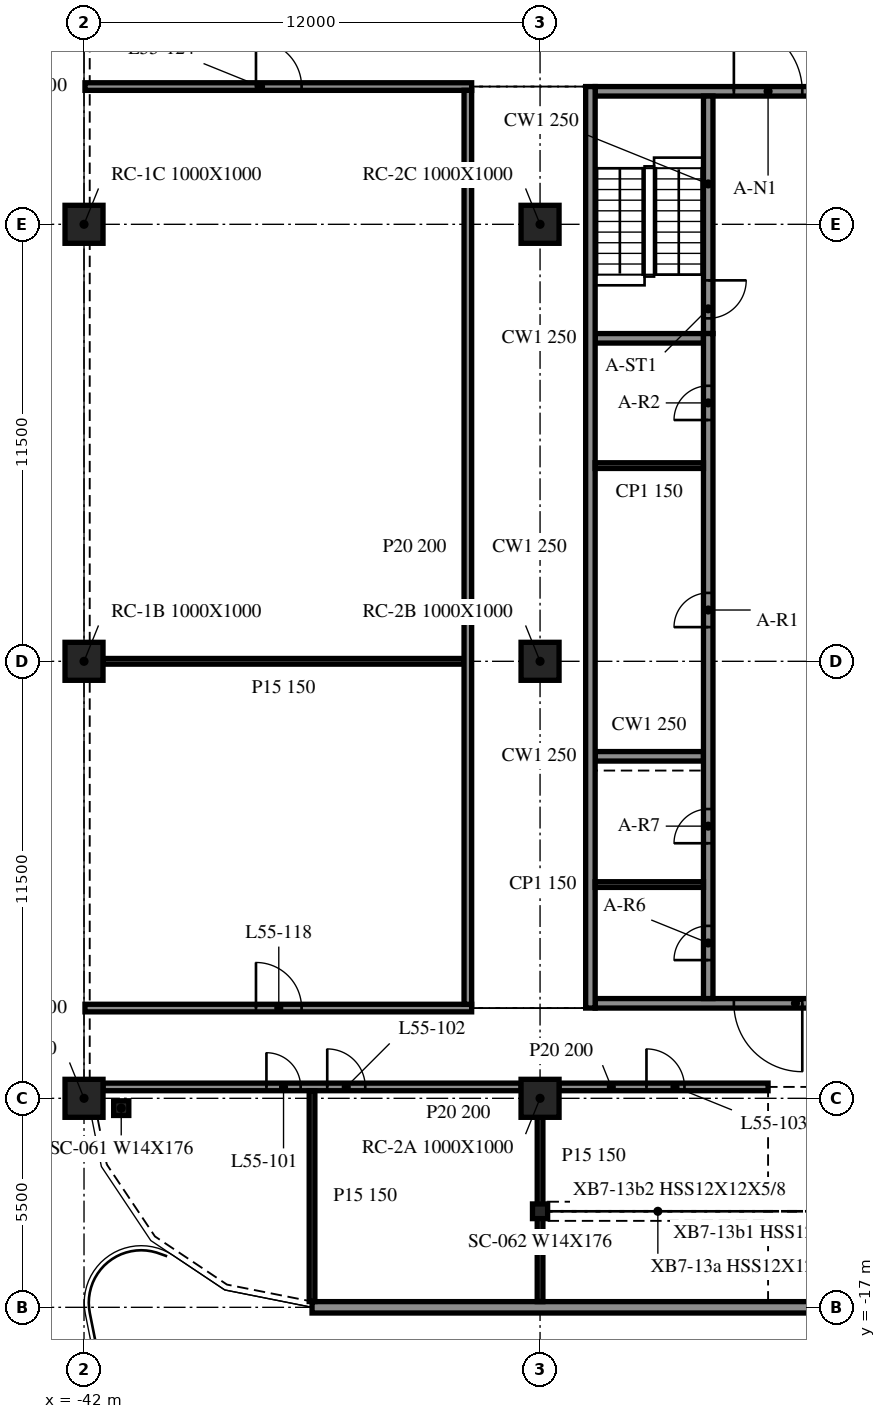
"""IFC4 building model, lengths in metres.
Left out: names, types, materials, properties, quantities, classifications, styles, units other than length and angle.
Written with IfcOpenShell. Run it as: python <this file> out.ifc"""

import sys

from ifc_helpers import new_model, si_unit, direction, frame, frame_2d, origin, origin_2d, place, context, subcontext, project, spatial, rectangle, i_section, extrude, element, fill, save


model = new_model("IFC4")
c1 = context("Model", 3, precision=1e-05, world=origin(), true_north=direction((0.0, 1.0)))
c2 = subcontext(c1, "Body", "Model", "MODEL_VIEW")
j1 = project(units=[si_unit("LENGTHUNIT", "METRE"), si_unit("PLANEANGLEUNIT", "RADIAN")], contexts=[c1])
p1 = place(None, origin())
s1 = spatial("IfcSite", under=j1, at=p1, CompositionType="ELEMENT")
p2 = place(p1, origin())
s2 = spatial("IfcBuilding", under=s1, at=p2, CompositionType="ELEMENT")
p3 = place(p2, frame((0.0, 0.0, 228.6)))
s3 = spatial("IfcBuildingStorey", under=s2, at=p3, CompositionType="ELEMENT", Elevation=228.6)
for number, where, z_axis, x_axis in (
    (1, (-42.0, -11.5, -0.34), (0.0, 0.0, 1.0), (1.0, 0.0, 0.0)),
    (2, (-42.0, 0.0, -0.34), (0.0, 0.0, 1.0), (1.0, 0.0, 0.0)),
    (3, (-42.0, 11.5, -0.34), (0.0, 0.0, 1.0), (1.0, 0.0, 0.0)),
    (4, (-30.0, -11.5, -0.34), (0.0, 0.0, 1.0), (1.0, 0.0, 0.0)),
    (5, (-30.0, 0.0, -0.34), (0.0, 0.0, 1.0), (1.0, 0.0, 0.0)),
    (6, (-30.0, 11.5, -0.34), (0.0, 0.0, 1.0), (1.0, 0.0, 0.0)),
):
    element("IfcColumn", number, at=place(p3, frame(where, z_axis=z_axis, x_axis=x_axis)), inside=s3, PredefinedType="COLUMN", context=c2, shape_type="SweptSolid", body=[
        extrude(rectangle(XDim=1.0, YDim=1.0, at=origin_2d()), origin(), (0.0, 0.0, 1.0), 3.8),
    ])
for number, where, z_axis, x_axis in (
    (7, (-41.021, -11.758, -0.34), (0.0, 0.0, 1.0), (1.0, 0.0, 0.0)),
    (8, (-30.0, -14.473, -0.34), (0.0, 0.0, 1.0), (1.0, 0.0, 0.0)),
):
    element("IfcColumn", number, at=place(p3, frame(where, z_axis=z_axis, x_axis=x_axis)), inside=s3, PredefinedType="COLUMN", context=c2, shape_type="SweptSolid", body=[
        extrude(i_section(OverallWidth=0.399, OverallDepth=0.386, WebThickness=0.021, FlangeThickness=0.033, at=origin_2d()), origin(), (0.0, 0.0, 1.0), 3.8),
    ])
p4 = place(p3, frame((-36.0, -17.0, 0.0), z_axis=(0.0, 0.0, 1.0), x_axis=(1.0, 0.0, 0.0)))
e9 = element("IfcWall", 9, at=p4, inside=s3, PredefinedType="NOTDEFINED", context=c2, shape_type="SweptSolid", body=[
    extrude(rectangle(XDim=84.0, YDim=0.3, at=frame_2d((42.0, 0.0))), origin(), (0.0, 0.0, 1.0), 2.853),
])
p5 = place(p4, frame((40.5, 0.0, 0.0)))
e10 = element("IfcOpeningElement", 10, at=p5, cuts=e9, PredefinedType="OPENING", context=c2, shape_type="SweptSolid", body=[
    extrude(rectangle(XDim=3.0, YDim=2.4, at=frame_2d((1.5, 1.2))), frame((0.0, 0.16, 0.0), z_axis=(0.0, -1.0, 0.0), x_axis=(1.0, 0.0, 0.0)), (0.0, 0.0, 1.0), 0.32),
])
p6 = place(p3, frame((-28.675, 15.125, 0.0), z_axis=(0.0, 0.0, 1.0), x_axis=(0.0, -1.0, 0.0)))
e11 = element("IfcWall", 11, at=p6, inside=s3, PredefinedType="SOLIDWALL", context=c2, shape_type="SweptSolid", body=[
    extrude(rectangle(XDim=24.25, YDim=0.25, at=frame_2d((12.125, 0.0))), origin(), (0.0, 0.0, 1.0), 3.46),
])
p7 = place(p3, frame((-19.45, -9.0, 0.0), z_axis=(0.0, 0.0, 1.0), x_axis=(-1.0, 0.0, 0.0)))
e12 = element("IfcWall", 12, at=p7, inside=s3, PredefinedType="SOLIDWALL", context=c2, shape_type="SweptSolid", body=[
    extrude(rectangle(XDim=9.1, YDim=0.25, at=frame_2d((4.55, 0.0))), origin(), (0.0, 0.0, 1.0), 3.46),
])
p8 = place(p7, frame((3.65, 0.0, 0.0)))
e13 = element("IfcOpeningElement", 13, at=p8, cuts=e12, PredefinedType="OPENING", context=c2, shape_type="SweptSolid", body=[
    extrude(rectangle(XDim=1.8, YDim=2.1, at=frame_2d((0.9, 1.05))), frame((0.0, 0.135, 0.0), z_axis=(0.0, -1.0, 0.0), x_axis=(1.0, 0.0, 0.0)), (0.0, 0.0, 1.0), 0.27),
])
p9 = place(p3, frame((-28.55, 15.0, 0.0), z_axis=(0.0, 0.0, 1.0), x_axis=(1.0, 0.0, 0.0)))
e14 = element("IfcWall", 14, at=p9, inside=s3, PredefinedType="SOLIDWALL", context=c2, shape_type="SweptSolid", body=[
    extrude(rectangle(XDim=9.1, YDim=0.25, at=frame_2d((4.55, 0.0))), origin(), (0.0, 0.0, 1.0), 3.46),
])
p10 = place(p9, frame((3.65, 0.0, 0.0)))
e15 = element("IfcOpeningElement", 15, at=p10, cuts=e14, PredefinedType="OPENING", context=c2, shape_type="SweptSolid", body=[
    extrude(rectangle(XDim=1.8, YDim=2.1, at=frame_2d((0.9, 1.05))), frame((0.0, 0.135, 0.0), z_axis=(0.0, -1.0, 0.0), x_axis=(1.0, 0.0, 0.0)), (0.0, 0.0, 1.0), 0.27),
])
p11 = place(p3, frame((-25.575, -8.875, 0.0), z_axis=(0.0, 0.0, 1.0), x_axis=(0.0, 1.0, 0.0)))
e16 = element("IfcWall", 16, at=p11, inside=s3, PredefinedType="SOLIDWALL", context=c2, shape_type="SweptSolid", body=[
    extrude(rectangle(XDim=17.5, YDim=0.25, at=frame_2d((8.75, 0.0))), origin(), (0.0, 0.0, 1.0), 3.46),
])
p12 = place(p11, frame((9.775, 0.0, 0.0)))
e17 = element("IfcOpeningElement", 17, at=p12, cuts=e16, PredefinedType="OPENING", context=c2, shape_type="SweptSolid", body=[
    extrude(rectangle(XDim=0.9, YDim=2.1, at=frame_2d((0.45, 1.05))), frame((0.0, 0.135, 0.0), z_axis=(0.0, -1.0, 0.0), x_axis=(1.0, 0.0, 0.0)), (0.0, 0.0, 1.0), 0.27),
])
p13 = place(p11, frame((15.225, 0.0, 0.0)))
e18 = element("IfcOpeningElement", 18, at=p13, cuts=e16, PredefinedType="OPENING", context=c2, shape_type="SweptSolid", body=[
    extrude(rectangle(XDim=0.9, YDim=2.1, at=frame_2d((0.45, 1.05))), frame((0.0, 0.135, 0.0), z_axis=(0.0, -1.0, 0.0), x_axis=(1.0, 0.0, 0.0)), (0.0, 0.0, 1.0), 0.27),
])
p14 = place(p11, frame((1.012, 0.0, 0.0)))
e19 = element("IfcOpeningElement", 19, at=p14, cuts=e16, PredefinedType="OPENING", context=c2, shape_type="SweptSolid", body=[
    extrude(rectangle(XDim=0.9, YDim=2.1, at=frame_2d((0.45, 1.05))), frame((0.0, 0.135, 0.0), z_axis=(0.0, -1.0, 0.0), x_axis=(1.0, 0.0, 0.0)), (0.0, 0.0, 1.0), 0.27),
])
p15 = place(p11, frame((4.087, 0.0, 0.0)))
e20 = element("IfcOpeningElement", 20, at=p15, cuts=e16, PredefinedType="OPENING", context=c2, shape_type="SweptSolid", body=[
    extrude(rectangle(XDim=0.9, YDim=2.1, at=frame_2d((0.45, 1.05))), frame((0.0, 0.135, 0.0), z_axis=(0.0, -1.0, 0.0), x_axis=(1.0, 0.0, 0.0)), (0.0, 0.0, 1.0), 0.27),
])
p16 = place(p3, frame((-25.575, 14.875, 0.0), z_axis=(0.0, 0.0, 1.0), x_axis=(0.0, -1.0, 0.0)))
e21 = element("IfcWall", 21, at=p16, inside=s3, PredefinedType="SOLIDWALL", context=c2, shape_type="SweptSolid", body=[
    extrude(rectangle(XDim=6.25, YDim=0.25, at=frame_2d((3.125, 0.0))), origin(), (0.0, 0.0, 1.0), 3.46),
])
p17 = place(p16, frame((4.85, 0.0, 0.0)))
e22 = element("IfcOpeningElement", 22, at=p17, cuts=e21, PredefinedType="OPENING", context=c2, shape_type="SweptSolid", body=[
    extrude(rectangle(XDim=1.0, YDim=2.1, at=frame_2d((0.5, 1.05))), frame((0.0, 0.135, 0.0), z_axis=(0.0, -1.0, 0.0), x_axis=(1.0, 0.0, 0.0)), (0.0, 0.0, 1.0), 0.27),
])
for number, where, z_axis, x_axis in (
    (23, (-28.55, -2.5, 0.0), (0.0, 0.0, 1.0), (1.0, 0.0, 0.0)),
    (24, (-28.55, 8.5, 0.0), (0.0, 0.0, 1.0), (1.0, 0.0, 0.0)),
):
    element("IfcWall", number, at=place(p3, frame(where, z_axis=z_axis, x_axis=x_axis)), inside=s3, PredefinedType="SOLIDWALL", context=c2, shape_type="SweptSolid", body=[
        extrude(rectangle(XDim=2.85, YDim=0.25, at=frame_2d((1.425, 0.0))), origin(), (0.0, 0.0, 1.0), 3.46),
    ])
for number, where, z_axis, x_axis in (
    (25, (-28.55, 5.15, 0.0), (0.0, 0.0, 1.0), (1.0, 0.0, 0.0)),
    (26, (-28.55, -5.875, 0.0), (0.0, 0.0, 1.0), (1.0, 0.0, 0.0)),
):
    element("IfcWall", number, at=place(p3, frame(where, z_axis=z_axis, x_axis=x_axis)), inside=s3, PredefinedType="PARTITIONING", context=c2, shape_type="SweptSolid", body=[
        extrude(rectangle(XDim=2.85, YDim=0.15, at=frame_2d((1.425, 0.0))), origin(), (0.0, 0.0, 1.0), 3.46),
    ])
p18 = place(p3, frame((-41.5, -11.2, 0.0), z_axis=(0.0, 0.0, 1.0), x_axis=(1.0, 0.0, 0.0)))
e27 = element("IfcWall", 27, at=p18, inside=s3, PredefinedType="PARTITIONING", context=c2, shape_type="SweptSolid", body=[
    extrude(rectangle(XDim=11.0, YDim=0.2, at=frame_2d((5.5, 0.0))), origin(), (0.0, 0.0, 1.0), 3.46),
])
p19 = place(p18, frame((4.3, 0.0, 0.0)))
e28 = element("IfcOpeningElement", 28, at=p19, cuts=e27, PredefinedType="OPENING", context=c2, shape_type="SweptSolid", body=[
    extrude(rectangle(XDim=0.9, YDim=2.1, at=frame_2d((0.45, 1.05))), frame((0.0, 0.11, 0.0), z_axis=(0.0, -1.0, 0.0), x_axis=(1.0, 0.0, 0.0)), (0.0, 0.0, 1.0), 0.22),
])
p20 = place(p18, frame((5.9, 0.0, 0.0)))
e29 = element("IfcOpeningElement", 29, at=p20, cuts=e27, PredefinedType="OPENING", context=c2, shape_type="SweptSolid", body=[
    extrude(rectangle(XDim=1.0, YDim=2.1, at=frame_2d((0.5, 1.05))), frame((0.0, 0.11, 0.0), z_axis=(0.0, -1.0, 0.0), x_axis=(1.0, 0.0, 0.0)), (0.0, 0.0, 1.0), 0.22),
])
p21 = place(p3, frame((-29.5, -11.2, 0.0), z_axis=(0.0, 0.0, 1.0), x_axis=(1.0, 0.0, 0.0)))
e30 = element("IfcWall", 30, at=p21, inside=s3, PredefinedType="PARTITIONING", context=c2, shape_type="SweptSolid", body=[
    extrude(rectangle(XDim=5.5, YDim=0.2, at=frame_2d((2.75, 0.0))), origin(), (0.0, 0.0, 1.0), 3.46),
])
p22 = place(p21, frame((2.3, 0.0, 0.0)))
e31 = element("IfcOpeningElement", 31, at=p22, cuts=e30, PredefinedType="OPENING", context=c2, shape_type="SweptSolid", body=[
    extrude(rectangle(XDim=1.0, YDim=2.1, at=frame_2d((0.5, 1.05))), frame((0.0, 0.11, 0.0), z_axis=(0.0, -1.0, 0.0), x_axis=(1.0, 0.0, 0.0)), (0.0, 0.0, 1.0), 0.22),
])
p23 = place(p3, frame((-41.975, -9.125, 0.0), z_axis=(0.0, 0.0, 1.0), x_axis=(1.0, 0.0, 0.0)))
e32 = element("IfcWall", 32, at=p23, inside=s3, PredefinedType="PARTITIONING", context=c2, shape_type="SweptSolid", body=[
    extrude(rectangle(XDim=10.175, YDim=0.2, at=frame_2d((5.087, 0.0))), origin(), (0.0, 0.0, 1.0), 3.46),
])
p24 = place(p23, frame((4.5, 0.0, 0.0)))
e33 = element("IfcOpeningElement", 33, at=p24, cuts=e32, PredefinedType="OPENING", context=c2, shape_type="SweptSolid", body=[
    extrude(rectangle(XDim=1.2, YDim=2.1, at=frame_2d((0.6, 1.05))), frame((0.0, 0.11, 0.0), z_axis=(0.0, -1.0, 0.0), x_axis=(1.0, 0.0, 0.0)), (0.0, 0.0, 1.0), 0.22),
])
p25 = place(p3, frame((-41.5, 0.0, 0.0), z_axis=(0.0, 0.0, 1.0), x_axis=(1.0, 0.0, 0.0)))
e34 = element("IfcWall", 34, at=p25, inside=s3, PredefinedType="PARTITIONING", context=c2, shape_type="SweptSolid", body=[
    extrude(rectangle(XDim=9.5, YDim=0.15, at=frame_2d((4.75, 0.0))), origin(), (0.0, 0.0, 1.0), 3.46),
])
p26 = place(p3, frame((-41.975, 15.125, 0.0), z_axis=(0.0, 0.0, 1.0), x_axis=(1.0, 0.0, 0.0)))
e35 = element("IfcWall", 35, at=p26, inside=s3, PredefinedType="PARTITIONING", context=c2, shape_type="SweptSolid", body=[
    extrude(rectangle(XDim=10.175, YDim=0.2, at=frame_2d((5.087, 0.0))), origin(), (0.0, 0.0, 1.0), 3.46),
])
p27 = place(p26, frame((4.5, 0.0, 0.0)))
e36 = element("IfcOpeningElement", 36, at=p27, cuts=e35, PredefinedType="OPENING", context=c2, shape_type="SweptSolid", body=[
    extrude(rectangle(XDim=1.2, YDim=2.1, at=frame_2d((0.6, 1.05))), frame((0.0, 0.11, 0.0), z_axis=(0.0, -1.0, 0.0), x_axis=(1.0, 0.0, 0.0)), (0.0, 0.0, 1.0), 0.22),
])
p28 = place(p3, frame((-36.0, -16.847, 0.0), z_axis=(0.0, 0.0, 1.0), x_axis=(0.0, 1.0, 0.0)))
e37 = element("IfcWall", 37, at=p28, inside=s3, PredefinedType="PARTITIONING", context=c2, shape_type="SweptSolid", body=[
    extrude(rectangle(XDim=5.547, YDim=0.15, at=frame_2d((2.773, 0.0))), origin(), (0.0, 0.0, 1.0), 3.46),
])
p29 = place(p3, frame((-31.9, -9.025, 0.0), z_axis=(0.0, 0.0, 1.0), x_axis=(0.0, 1.0, 0.0)))
e38 = element("IfcWall", 38, at=p29, inside=s3, PredefinedType="PARTITIONING", context=c2, shape_type="SweptSolid", body=[
    extrude(rectangle(XDim=24.05, YDim=0.2, at=frame_2d((12.025, 0.0))), origin(), (0.0, 0.0, 1.0), 3.46),
])
p30 = place(p3, frame((-30.0, -16.85, 0.0), z_axis=(0.0, 0.0, 1.0), x_axis=(0.0, 1.0, 0.0)))
e39 = element("IfcWall", 39, at=p30, inside=s3, PredefinedType="PARTITIONING", context=c2, shape_type="SweptSolid", body=[
    extrude(rectangle(XDim=4.85, YDim=0.15, at=frame_2d((2.425, 0.0))), origin(), (0.0, 0.0, 1.0), 3.46),
])
p31 = place(p8, origin())
e40 = element("IfcDoor", 40, at=p31, inside=s3, OperationType="DOUBLE_DOOR_SINGLE_SWING", PredefinedType="DOOR", context=c2, shape_type="SweptSolid", body=[
    extrude(rectangle(XDim=1.8, YDim=2.1, at=frame_2d((0.9, 1.05))), frame((0.0, 0.025, 0.0), z_axis=(0.0, -1.0, 0.0), x_axis=(1.0, 0.0, 0.0)), (0.0, 0.0, 1.0), 0.05),
])
fill(e13, e40)
p32 = place(p10, origin())
e41 = element("IfcDoor", 41, at=p32, inside=s3, OperationType="DOUBLE_DOOR_SINGLE_SWING", PredefinedType="DOOR", context=c2, shape_type="SweptSolid", body=[
    extrude(rectangle(XDim=1.8, YDim=2.1, at=frame_2d((0.9, 1.05))), frame((0.0, 0.025, 0.0), z_axis=(0.0, -1.0, 0.0), x_axis=(1.0, 0.0, 0.0)), (0.0, 0.0, 1.0), 0.05),
])
fill(e15, e41)
p33 = place(p12, origin())
e42 = element("IfcDoor", 42, at=p33, inside=s3, OperationType="SINGLE_SWING_LEFT", PredefinedType="DOOR", context=c2, shape_type="SweptSolid", body=[
    extrude(rectangle(XDim=0.9, YDim=2.1, at=frame_2d((0.45, 1.05))), frame((0.0, 0.025, 0.0), z_axis=(0.0, -1.0, 0.0), x_axis=(1.0, 0.0, 0.0)), (0.0, 0.0, 1.0), 0.05),
])
fill(e17, e42)
p34 = place(p13, origin())
e43 = element("IfcDoor", 43, at=p34, inside=s3, OperationType="SINGLE_SWING_RIGHT", PredefinedType="DOOR", context=c2, shape_type="SweptSolid", body=[
    extrude(rectangle(XDim=0.9, YDim=2.1, at=frame_2d((0.45, 1.05))), frame((0.0, 0.025, 0.0), z_axis=(0.0, -1.0, 0.0), x_axis=(1.0, 0.0, 0.0)), (0.0, 0.0, 1.0), 0.05),
])
fill(e18, e43)
p35 = place(p14, origin())
e44 = element("IfcDoor", 44, at=p35, inside=s3, OperationType="SINGLE_SWING_RIGHT", PredefinedType="DOOR", context=c2, shape_type="SweptSolid", body=[
    extrude(rectangle(XDim=0.9, YDim=2.1, at=frame_2d((0.45, 1.05))), frame((0.0, 0.025, 0.0), z_axis=(0.0, -1.0, 0.0), x_axis=(1.0, 0.0, 0.0)), (0.0, 0.0, 1.0), 0.05),
])
fill(e19, e44)
p36 = place(p15, origin())
e45 = element("IfcDoor", 45, at=p36, inside=s3, OperationType="SINGLE_SWING_LEFT", PredefinedType="DOOR", context=c2, shape_type="SweptSolid", body=[
    extrude(rectangle(XDim=0.9, YDim=2.1, at=frame_2d((0.45, 1.05))), frame((0.0, 0.025, 0.0), z_axis=(0.0, -1.0, 0.0), x_axis=(1.0, 0.0, 0.0)), (0.0, 0.0, 1.0), 0.05),
])
fill(e20, e45)
p37 = place(p17, origin())
e46 = element("IfcDoor", 46, at=p37, inside=s3, OperationType="SINGLE_SWING_LEFT", PredefinedType="DOOR", context=c2, shape_type="SweptSolid", body=[
    extrude(rectangle(XDim=1.0, YDim=2.1, at=frame_2d((0.5, 1.05))), frame((0.0, 0.025, 0.0), z_axis=(0.0, -1.0, 0.0), x_axis=(1.0, 0.0, 0.0)), (0.0, 0.0, 1.0), 0.05),
])
fill(e22, e46)
p38 = place(p19, origin())
e47 = element("IfcDoor", 47, at=p38, inside=s3, OperationType="SINGLE_SWING_RIGHT", PredefinedType="DOOR", context=c2, shape_type="SweptSolid", body=[
    extrude(rectangle(XDim=0.9, YDim=2.1, at=frame_2d((0.45, 1.05))), frame((0.0, 0.025, 0.0), z_axis=(0.0, -1.0, 0.0), x_axis=(1.0, 0.0, 0.0)), (0.0, 0.0, 1.0), 0.05),
])
fill(e28, e47)
p39 = place(p20, origin())
e48 = element("IfcDoor", 48, at=p39, inside=s3, OperationType="SINGLE_SWING_LEFT", PredefinedType="DOOR", context=c2, shape_type="SweptSolid", body=[
    extrude(rectangle(XDim=1.0, YDim=2.1, at=frame_2d((0.5, 1.05))), frame((0.0, 0.025, 0.0), z_axis=(0.0, -1.0, 0.0), x_axis=(1.0, 0.0, 0.0)), (0.0, 0.0, 1.0), 0.05),
])
fill(e29, e48)
p40 = place(p22, origin())
e49 = element("IfcDoor", 49, at=p40, inside=s3, OperationType="SINGLE_SWING_LEFT", PredefinedType="DOOR", context=c2, shape_type="SweptSolid", body=[
    extrude(rectangle(XDim=1.0, YDim=2.1, at=frame_2d((0.5, 1.05))), frame((0.0, 0.025, 0.0), z_axis=(0.0, -1.0, 0.0), x_axis=(1.0, 0.0, 0.0)), (0.0, 0.0, 1.0), 0.05),
])
fill(e31, e49)
p41 = place(p24, origin())
e50 = element("IfcDoor", 50, at=p41, inside=s3, OperationType="SINGLE_SWING_RIGHT", PredefinedType="DOOR", context=c2, shape_type="SweptSolid", body=[
    extrude(rectangle(XDim=1.2, YDim=2.1, at=frame_2d((0.6, 1.05))), frame((0.0, 0.025, 0.0), z_axis=(0.0, -1.0, 0.0), x_axis=(1.0, 0.0, 0.0)), (0.0, 0.0, 1.0), 0.05),
])
fill(e33, e50)
p42 = place(p27, origin())
e51 = element("IfcDoor", 51, at=p42, inside=s3, OperationType="SINGLE_SWING_LEFT", PredefinedType="DOOR", context=c2, shape_type="SweptSolid", body=[
    extrude(rectangle(XDim=1.2, YDim=2.1, at=frame_2d((0.6, 1.05))), frame((0.0, 0.025, 0.0), z_axis=(0.0, -1.0, 0.0), x_axis=(1.0, 0.0, 0.0)), (0.0, 0.0, 1.0), 0.05),
])
fill(e36, e51)
save(model, sys.argv[1])
